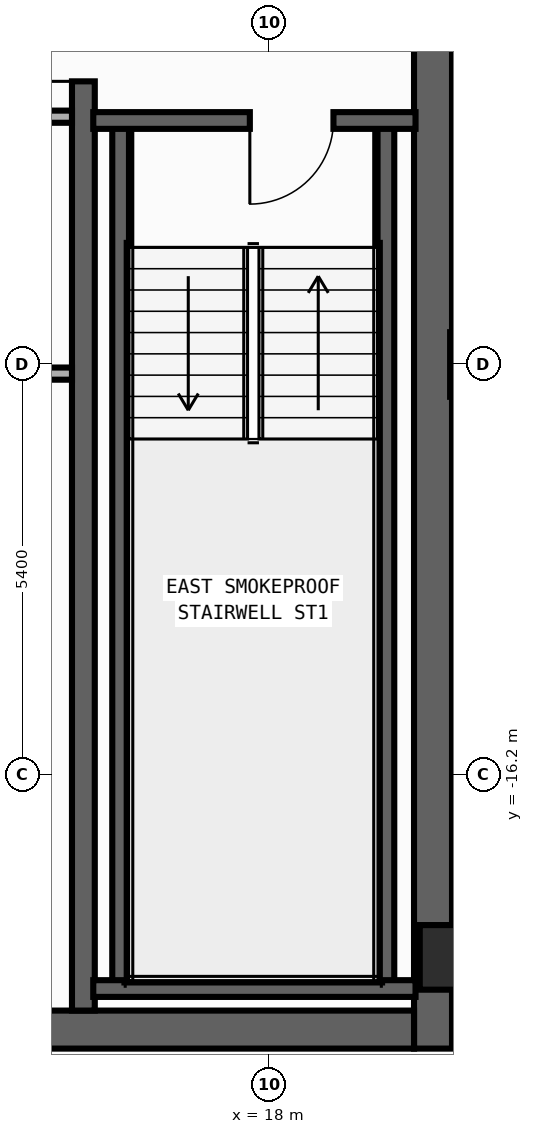
"""IFC4 building model, lengths in metres.
Left out: names, types, materials, properties, quantities, classifications, styles, units other than length and angle.
Written with IfcOpenShell. Run it as: python <this file> out.ifc"""

import sys

from ifc_helpers import new_model, si_unit, direction, frame, frame_2d, origin, origin_2d, place, context, subcontext, project, spatial, rectangle, extrude, element, fill, save


model = new_model("IFC4")
c1 = context("Model", 3, precision=1e-05, world=origin(), true_north=direction((0.0, 1.0)))
c2 = subcontext(c1, "Body", "Model", "MODEL_VIEW")
j1 = project(units=[si_unit("LENGTHUNIT", "METRE"), si_unit("PLANEANGLEUNIT", "RADIAN")], contexts=[c1])
p1 = place(None, origin())
s1 = spatial("IfcSite", under=j1, at=p1, CompositionType="ELEMENT")
p2 = place(p1, origin())
s2 = spatial("IfcBuilding", under=s1, at=p2, CompositionType="ELEMENT")
p3 = place(p2, frame((0.0, 0.0, 254.8)))
s3 = spatial("IfcBuildingStorey", under=s2, at=p3, CompositionType="ELEMENT", Elevation=254.8)
p4 = place(p3, frame((20.15, -19.8, 0.0), z_axis=(0.0, 0.0, 1.0), x_axis=(0.0, 1.0, 0.0)))
e1 = element("IfcWall", 1, at=p4, inside=s3, PredefinedType="SHEAR", context=c2, shape_type="SweptSolid", body=[
    extrude(rectangle(XDim=27.0, YDim=0.5, at=frame_2d((13.5, 0.0))), origin(), (0.0, 0.0, 1.0), 3.34),
])
p5 = place(p3, frame((12.5, -19.55, 0.0), z_axis=(0.0, 0.0, 1.0), x_axis=(1.0, 0.0, 0.0)))
e2 = element("IfcWall", 2, at=p5, inside=s3, PredefinedType="SHEAR", context=c2, shape_type="SweptSolid", body=[
    extrude(rectangle(XDim=7.4, YDim=0.5, at=frame_2d((3.7, 0.0))), origin(), (0.0, 0.0, 1.0), 3.34),
])
p6 = place(p3, frame((15.55, -19.3, 0.0), z_axis=(0.0, 0.0, 1.0), x_axis=(0.0, 1.0, 0.0)))
e3 = element("IfcWall", 3, at=p6, inside=s3, PredefinedType="SHEAR", context=c2, shape_type="SweptSolid", body=[
    extrude(rectangle(XDim=26.0, YDim=0.3, at=frame_2d((13.0, 0.0))), origin(), (0.0, 0.0, 1.0), 3.34),
])
p7 = place(p6, frame((12.225, 0.0, 0.0)))
e4 = element("IfcOpeningElement", 4, at=p7, cuts=e3, PredefinedType="OPENING", context=c2, shape_type="SweptSolid", body=[
    extrude(rectangle(XDim=1.15, YDim=2.2, at=frame_2d((0.575, 1.1))), frame((0.0, 0.16, 0.0), z_axis=(0.0, -1.0, 0.0), x_axis=(1.0, 0.0, 0.0)), (0.0, 0.0, 1.0), 0.32),
])
p8 = place(p6, frame((24.625, 0.0, 0.0)))
e5 = element("IfcOpeningElement", 5, at=p8, cuts=e3, PredefinedType="OPENING", context=c2, shape_type="SweptSolid", body=[
    extrude(rectangle(XDim=0.85, YDim=2.1, at=frame_2d((0.425, 1.05))), frame((0.0, 0.16, 0.0), z_axis=(0.0, -1.0, 0.0), x_axis=(1.0, 0.0, 0.0)), (0.0, 0.0, 1.0), 0.32),
])
for number, where, z_axis, x_axis in (
    (6, (16.04, -19.01, 0.0), (0.0, 0.0, 1.0), (0.0, 1.0, 0.0)),
    (7, (19.53, -19.01, 0.0), (0.0, 0.0, 1.0), (0.0, 1.0, 0.0)),
):
    element("IfcWall", number, at=place(p3, frame(where, z_axis=z_axis, x_axis=x_axis)), inside=s3, PredefinedType="SHEAR", context=c2, shape_type="SweptSolid", body=[
        extrude(rectangle(XDim=11.42, YDim=0.22, at=frame_2d((5.71, 0.0))), origin(), (0.0, 0.0, 1.0), 3.34),
    ])
p9 = place(p3, frame((15.68, -19.01, 0.0), z_axis=(0.0, 0.0, 1.0), x_axis=(1.0, 0.0, 0.0)))
e8 = element("IfcWall", 8, at=p9, inside=s3, PredefinedType="SHEAR", context=c2, shape_type="SweptSolid", body=[
    extrude(rectangle(XDim=4.24, YDim=0.22, at=frame_2d((2.12, 0.0))), origin(), (0.0, 0.0, 1.0), 3.34),
])
p10 = place(p3, frame((19.92, -7.59, 0.0), z_axis=(0.0, 0.0, 1.0), x_axis=(-1.0, 0.0, 0.0)))
e9 = element("IfcWall", 9, at=p10, inside=s3, PredefinedType="SHEAR", context=c2, shape_type="SweptSolid", body=[
    extrude(rectangle(XDim=4.24, YDim=0.22, at=frame_2d((2.12, 0.0))), origin(), (0.0, 0.0, 1.0), 3.34),
])
p11 = place(p10, frame((1.08, 0.0, 0.0)))
e10 = element("IfcOpeningElement", 10, at=p11, cuts=e9, PredefinedType="OPENING", context=c2, shape_type="SweptSolid", body=[
    extrude(rectangle(XDim=1.1, YDim=2.2, at=frame_2d((0.55, 1.1))), frame((0.0, 0.12, 0.0), z_axis=(0.0, -1.0, 0.0), x_axis=(1.0, 0.0, 0.0)), (0.0, 0.0, 1.0), 0.24),
])
for number, where, z_axis, x_axis in (
    (11, (20.4, -18.6, 0.0), (0.0, 0.0, 1.0), (1.0, 0.0, 0.0)),
    (12, (20.8, -10.8, 0.0), (0.0, 0.0, 1.0), (1.0, 0.0, 0.0)),
):
    element("IfcColumn", number, at=place(p3, frame(where, z_axis=z_axis, x_axis=x_axis)), inside=s3, PredefinedType="COLUMN", context=c2, shape_type="SweptSolid", body=[
        extrude(rectangle(XDim=0.85, YDim=0.85, at=origin_2d()), origin(), (0.0, 0.0, 1.0), 3.6),
    ])
p12 = place(p3, frame((12.8, -7.54, 0.0), z_axis=(0.0, 0.0, 1.0), x_axis=(1.0, 0.0, 0.0)))
e13 = element("IfcWall", 13, at=p12, inside=s3, PredefinedType="STANDARD", context=c2, shape_type="SweptSolid", body=[
    extrude(rectangle(XDim=2.6, YDim=0.16, at=frame_2d((1.3, 0.0))), origin(), (0.0, 0.0, 1.0), 3.34),
])
p13 = place(p3, frame((12.5, -10.92, 0.0), z_axis=(0.0, 0.0, 1.0), x_axis=(1.0, 0.0, 0.0)))
e14 = element("IfcWall", 14, at=p13, inside=s3, PredefinedType="PARTITIONING", context=c2, shape_type="SweptSolid", body=[
    extrude(rectangle(XDim=2.9, YDim=0.16, at=frame_2d((1.45, 0.0))), origin(), (0.0, 0.0, 1.0), 2.44),
])
p14 = place(p11, origin())
e15 = element("IfcDoor", 15, at=p14, inside=s3, OperationType="SINGLE_SWING_RIGHT", PredefinedType="DOOR", context=c2, shape_type="SweptSolid", body=[
    extrude(rectangle(XDim=1.1, YDim=2.2, at=frame_2d((0.55, 1.1))), frame((0.0, 0.025, 0.0), z_axis=(0.0, -1.0, 0.0), x_axis=(1.0, 0.0, 0.0)), (0.0, 0.0, 1.0), 0.05),
])
fill(e10, e15)
p15 = place(p7, origin())
e16 = element("IfcDoor", 16, at=p15, inside=s3, OperationType="SINGLE_SWING_LEFT", PredefinedType="DOOR", context=c2, shape_type="SweptSolid", body=[
    extrude(rectangle(XDim=1.15, YDim=2.2, at=frame_2d((0.575, 1.1))), frame((0.0, 0.025, 0.0), z_axis=(0.0, -1.0, 0.0), x_axis=(1.0, 0.0, 0.0)), (0.0, 0.0, 1.0), 0.05),
])
fill(e4, e16)
save(model, sys.argv[1])
